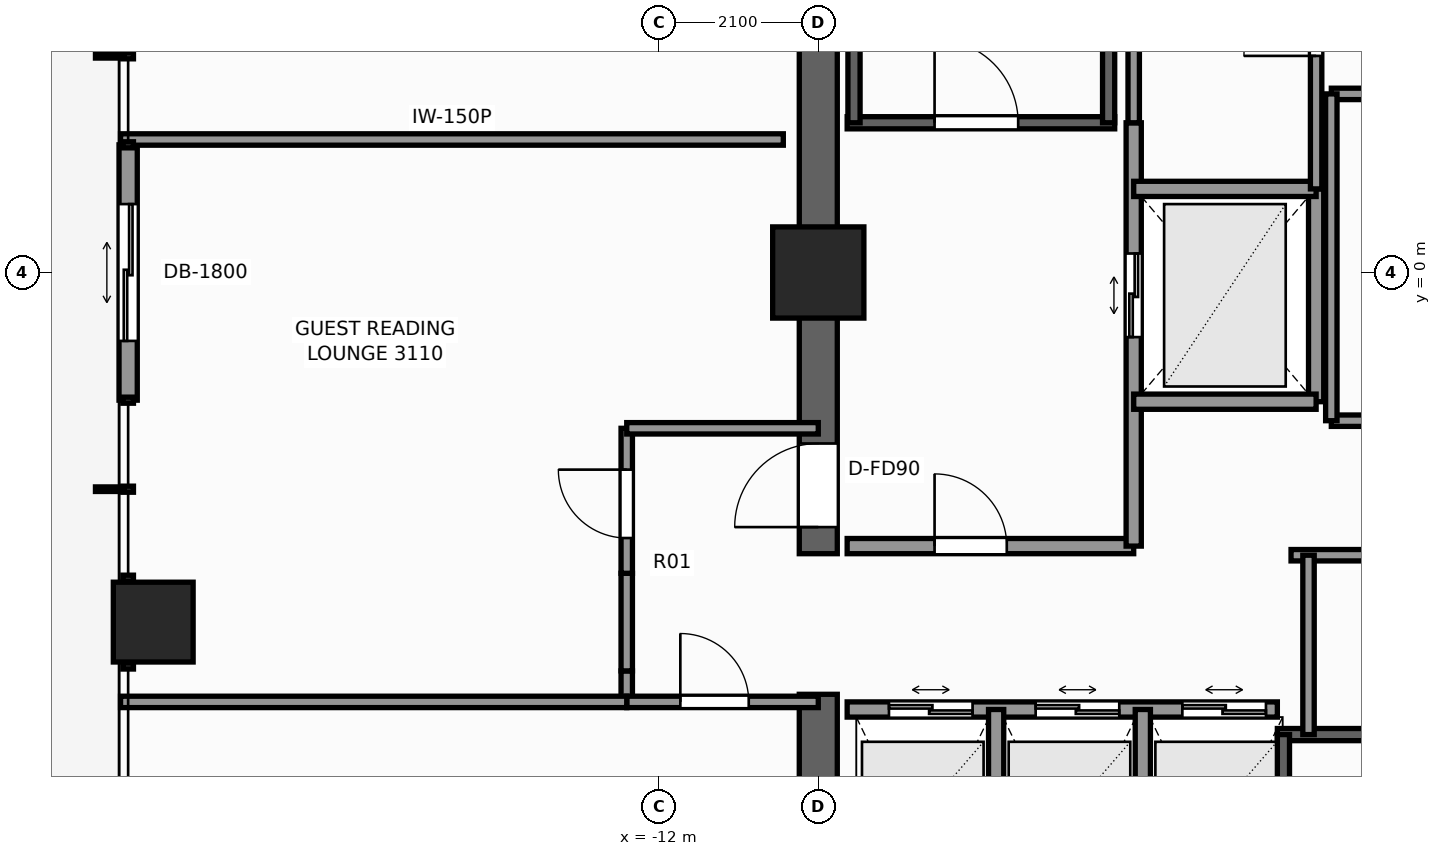
"""IFC4 building model, lengths in metres.
Left out: names, types, materials, properties, quantities, classifications, styles, units other than length and angle.
Written with IfcOpenShell. Run it as: python <this file> out.ifc"""

import sys

from ifc_helpers import new_model, si_unit, direction, frame, frame_2d, origin, origin_2d, place, context, subcontext, project, spatial, rectangle, extrude, element, fill, save


model = new_model("IFC4")
c1 = context("Model", 3, precision=1e-05, world=origin(), true_north=direction((0.0, 1.0)))
c2 = subcontext(c1, "Body", "Model", "MODEL_VIEW")
j1 = project(units=[si_unit("LENGTHUNIT", "METRE"), si_unit("PLANEANGLEUNIT", "RADIAN")], contexts=[c1])
p1 = place(None, origin())
s1 = spatial("IfcSite", under=j1, at=p1, CompositionType="ELEMENT")
p2 = place(p1, origin())
s2 = spatial("IfcBuilding", under=s1, at=p2, CompositionType="ELEMENT")
p3 = place(p2, frame((0.0, 0.0, 108.5)))
s3 = spatial("IfcBuildingStorey", under=s2, at=p3, CompositionType="ELEMENT", Elevation=108.5)
p4 = place(p3, frame((-9.9, -9.65, 0.0), z_axis=(0.0, 0.0, 1.0), x_axis=(0.0, 1.0, 0.0)))
e1 = element("IfcWall", 1, at=p4, inside=s3, PredefinedType="SHEAR", context=c2, shape_type="SweptSolid", body=[
    extrude(rectangle(XDim=4.1, YDim=0.5, at=frame_2d((2.05, 0.0))), origin(), (0.0, 0.0, 1.0), 3.3),
])
p5 = place(p3, frame((-9.9, -3.7, 0.0), z_axis=(0.0, 0.0, 1.0), x_axis=(0.0, 1.0, 0.0)))
e2 = element("IfcWall", 2, at=p5, inside=s3, PredefinedType="SHEAR", context=c2, shape_type="SweptSolid", body=[
    extrude(rectangle(XDim=13.35, YDim=0.5, at=frame_2d((6.675, 0.0))), origin(), (0.0, 0.0, 1.0), 3.3),
])
p6 = place(p5, frame((0.35, 0.0, 0.0)))
e3 = element("IfcOpeningElement", 3, at=p6, cuts=e2, PredefinedType="OPENING", context=c2, shape_type="SweptSolid", body=[
    extrude(rectangle(XDim=1.1, YDim=2.2, at=frame_2d((0.55, 1.1))), frame((0.0, 0.26, 0.0), z_axis=(0.0, -1.0, 0.0), x_axis=(1.0, 0.0, 0.0)), (0.0, 0.0, 1.0), 0.52),
])
p7 = place(p3, frame((-9.9, 0.0, 0.0), z_axis=(0.0, 0.0, 1.0), x_axis=(1.0, 0.0, 0.0)))
e4 = element("IfcColumn", 4, at=p7, inside=s3, PredefinedType="COLUMN", context=c2, shape_type="SweptSolid", body=[
    extrude(rectangle(XDim=1.2, YDim=1.2, at=origin_2d()), origin(), (0.0, 0.0, 1.0), 3.3),
])
p8 = place(p3, frame((-18.65, -4.6, 0.0), z_axis=(0.0, 0.0, 1.0), x_axis=(1.0, 0.0, 0.0)))
e5 = element("IfcColumn", 5, at=p8, inside=s3, PredefinedType="COLUMN", context=c2, shape_type="SweptSolid", body=[
    extrude(rectangle(XDim=1.05, YDim=1.05, at=origin_2d()), origin(), (0.0, 0.0, 1.0), 3.3),
])
p9 = place(p3, frame((-18.98, -1.68, 0.0), z_axis=(0.0, 0.0, 1.0), x_axis=(0.0, 1.0, 0.0)))
e6 = element("IfcWall", 6, at=p9, inside=s3, PredefinedType="STANDARD", context=c2, shape_type="SweptSolid", body=[
    extrude(rectangle(XDim=3.36, YDim=0.24, at=frame_2d((1.68, 0.0))), origin(), (0.0, 0.0, 1.0), 3.08),
])
p10 = place(p9, frame((0.78, 0.0, 0.0)))
e7 = element("IfcOpeningElement", 7, at=p10, cuts=e6, PredefinedType="OPENING", context=c2, shape_type="SweptSolid", body=[
    extrude(rectangle(XDim=1.8, YDim=2.2, at=frame_2d((0.9, 1.1))), frame((0.0, 0.13, 0.0), z_axis=(0.0, -1.0, 0.0), x_axis=(1.0, 0.0, 0.0)), (0.0, 0.0, 1.0), 0.26),
])
p11 = place(p3, frame((-9.52, 1.97, 0.0), z_axis=(0.0, 0.0, 1.0), x_axis=(1.0, 0.0, 0.0)))
e8 = element("IfcWall", 8, at=p11, inside=s3, PredefinedType="SHEAR", context=c2, shape_type="SweptSolid", body=[
    extrude(rectangle(XDim=3.52, YDim=0.16, at=frame_2d((1.76, 0.0))), origin(), (0.0, 0.0, 1.0), 3.3),
])
p12 = place(p11, frame((1.15, 0.0, 0.0)))
e9 = element("IfcOpeningElement", 9, at=p12, cuts=e8, PredefinedType="OPENING", context=c2, shape_type="SweptSolid", body=[
    extrude(rectangle(XDim=1.1, YDim=2.2, at=frame_2d((0.55, 1.1))), frame((0.0, 0.09, 0.0), z_axis=(0.0, -1.0, 0.0), x_axis=(1.0, 0.0, 0.0)), (0.0, 0.0, 1.0), 0.18),
])
for number, where, z_axis, x_axis in (
    (10, (-9.43, 1.97, 0.0), (0.0, 0.0, 1.0), (0.0, 1.0, 0.0)),
    (11, (-6.08, 1.97, 0.0), (0.0, 0.0, 1.0), (0.0, 1.0, 0.0)),
):
    element("IfcWall", number, at=place(p3, frame(where, z_axis=z_axis, x_axis=x_axis)), inside=s3, PredefinedType="SHEAR", context=c2, shape_type="SweptSolid", body=[
        extrude(rectangle(XDim=7.56, YDim=0.16, at=frame_2d((3.78, 0.0))), origin(), (0.0, 0.0, 1.0), 3.3),
    ])
p13 = place(p3, frame((-3.86, -6.08, 0.0), z_axis=(0.0, 0.0, 1.0), x_axis=(1.0, 0.0, 0.0)))
e12 = element("IfcWall", 12, at=p13, inside=s3, PredefinedType="SHEAR", context=c2, shape_type="SweptSolid", body=[
    extrude(rectangle(XDim=7.72, YDim=0.16, at=frame_2d((3.86, 0.0))), origin(), (0.0, 0.0, 1.0), 3.3),
])
p14 = place(p3, frame((-3.78, -9.43, 0.0), z_axis=(0.0, 0.0, 1.0), x_axis=(0.0, 1.0, 0.0)))
e13 = element("IfcWall", 13, at=p14, inside=s3, PredefinedType="SHEAR", context=c2, shape_type="SweptSolid", body=[
    extrude(rectangle(XDim=3.35, YDim=0.16, at=frame_2d((1.675, 0.0))), origin(), (0.0, 0.0, 1.0), 3.3),
])
p15 = place(p3, frame((-9.52, -3.6, 0.0), z_axis=(0.0, 0.0, 1.0), x_axis=(1.0, 0.0, 0.0)))
e14 = element("IfcWall", 14, at=p15, inside=s3, PredefinedType="SOLIDWALL", context=c2, shape_type="SweptSolid", body=[
    extrude(rectangle(XDim=3.77, YDim=0.2, at=frame_2d((1.885, 0.0))), origin(), (0.0, 0.0, 1.0), 3.08),
])
p16 = place(p15, frame((1.15, 0.0, 0.0)))
e15 = element("IfcOpeningElement", 15, at=p16, cuts=e14, PredefinedType="OPENING", context=c2, shape_type="SweptSolid", body=[
    extrude(rectangle(XDim=0.95, YDim=2.06, at=frame_2d((0.475, 1.03))), frame((0.0, 0.11, 0.0), z_axis=(0.0, -1.0, 0.0), x_axis=(1.0, 0.0, 0.0)), (0.0, 0.0, 1.0), 0.22),
])
p17 = place(p3, frame((-5.75, -3.6, 0.0), z_axis=(0.0, 0.0, 1.0), x_axis=(0.0, 1.0, 0.0)))
e16 = element("IfcWall", 16, at=p17, inside=s3, PredefinedType="SOLIDWALL", context=c2, shape_type="SweptSolid", body=[
    extrude(rectangle(XDim=5.57, YDim=0.2, at=frame_2d((2.785, 0.0))), origin(), (0.0, 0.0, 1.0), 2.715),
])
p18 = place(p17, frame((2.75, 0.0, 0.0)))
e17 = element("IfcOpeningElement", 17, at=p18, cuts=e16, PredefinedType="OPENING", context=c2, shape_type="SweptSolid", body=[
    extrude(rectangle(XDim=1.1, YDim=2.2, at=frame_2d((0.55, 1.1))), frame((0.0, 0.11, 0.0), z_axis=(0.0, -1.0, 0.0), x_axis=(1.0, 0.0, 0.0)), (0.0, 0.0, 1.0), 0.22),
])
p19 = place(p3, frame((-3.35, -1.7, 0.0), z_axis=(0.0, 0.0, 1.0), x_axis=(0.0, 1.0, 0.0)))
e18 = element("IfcWall", 18, at=p19, inside=s3, PredefinedType="SOLIDWALL", context=c2, shape_type="SweptSolid", body=[
    extrude(rectangle(XDim=2.8, YDim=0.2, at=frame_2d((1.4, 0.0))), origin(), (0.0, 0.0, 1.0), 2.715),
])
for number, where, z_axis, x_axis in (
    (19, (-5.75, -1.7, 0.0), (0.0, 0.0, 1.0), (1.0, 0.0, 0.0)),
    (20, (-5.75, 1.1, 0.0), (0.0, 0.0, 1.0), (1.0, 0.0, 0.0)),
):
    element("IfcWall", number, at=place(p3, frame(where, z_axis=z_axis, x_axis=x_axis)), inside=s3, PredefinedType="SOLIDWALL", context=c2, shape_type="SweptSolid", body=[
        extrude(rectangle(XDim=2.4, YDim=0.2, at=frame_2d((1.2, 0.0))), origin(), (0.0, 0.0, 1.0), 3.08),
    ])
p20 = place(p3, frame((-9.52, -5.75, 0.0), z_axis=(0.0, 0.0, 1.0), x_axis=(1.0, 0.0, 0.0)))
e21 = element("IfcWall", 21, at=p20, inside=s3, PredefinedType="SOLIDWALL", context=c2, shape_type="SweptSolid", body=[
    extrude(rectangle(XDim=5.66, YDim=0.2, at=frame_2d((2.83, 0.0))), origin(), (0.0, 0.0, 1.0), 3.08),
])
p21 = place(p20, frame((0.55, 0.0, 0.0)))
e22 = element("IfcOpeningElement", 22, at=p21, cuts=e21, PredefinedType="OPENING", context=c2, shape_type="SweptSolid", body=[
    extrude(rectangle(XDim=1.1, YDim=2.2, at=frame_2d((0.55, 1.1))), frame((0.0, 0.11, 0.0), z_axis=(0.0, -1.0, 0.0), x_axis=(1.0, 0.0, 0.0)), (0.0, 0.0, 1.0), 0.22),
])
p22 = place(p20, frame((2.48, 0.0, 0.0)))
e23 = element("IfcOpeningElement", 23, at=p22, cuts=e21, PredefinedType="OPENING", context=c2, shape_type="SweptSolid", body=[
    extrude(rectangle(XDim=1.1, YDim=2.2, at=frame_2d((0.55, 1.1))), frame((0.0, 0.11, 0.0), z_axis=(0.0, -1.0, 0.0), x_axis=(1.0, 0.0, 0.0)), (0.0, 0.0, 1.0), 0.22),
])
p23 = place(p20, frame((4.41, 0.0, 0.0)))
e24 = element("IfcOpeningElement", 24, at=p23, cuts=e21, PredefinedType="OPENING", context=c2, shape_type="SweptSolid", body=[
    extrude(rectangle(XDim=1.1, YDim=2.2, at=frame_2d((0.55, 1.1))), frame((0.0, 0.11, 0.0), z_axis=(0.0, -1.0, 0.0), x_axis=(1.0, 0.0, 0.0)), (0.0, 0.0, 1.0), 0.22),
])
for number, where, z_axis, x_axis in (
    (25, (-7.56, -9.52, 0.0), (0.0, 0.0, 1.0), (0.0, 1.0, 0.0)),
    (26, (-5.63, -9.52, 0.0), (0.0, 0.0, 1.0), (0.0, 1.0, 0.0)),
):
    element("IfcWall", number, at=place(p3, frame(where, z_axis=z_axis, x_axis=x_axis)), inside=s3, PredefinedType="SOLIDWALL", context=c2, shape_type="SweptSolid", body=[
        extrude(rectangle(XDim=3.77, YDim=0.2, at=frame_2d((1.885, 0.0))), origin(), (0.0, 0.0, 1.0), 3.08),
    ])
p24 = place(p3, frame((-3.15, 2.35, 0.0), z_axis=(0.0, 0.0, 1.0), x_axis=(1.0, 0.0, 0.0)))
e27 = element("IfcWall", 27, at=p24, inside=s3, PredefinedType="PARTITIONING", context=c2, shape_type="SweptSolid", body=[
    extrude(rectangle(XDim=6.3, YDim=0.15, at=frame_2d((3.15, 0.0))), origin(), (0.0, 0.0, 1.0), 2.715),
])
p25 = place(p24, frame((4.1, 0.0, 0.0)))
e28 = element("IfcOpeningElement", 28, at=p25, cuts=e27, PredefinedType="OPENING", context=c2, shape_type="SweptSolid", body=[
    extrude(rectangle(XDim=1.2, YDim=2.2, at=frame_2d((0.6, 1.1))), frame((0.0, 0.085, 0.0), z_axis=(0.0, -1.0, 0.0), x_axis=(1.0, 0.0, 0.0)), (0.0, 0.0, 1.0), 0.17),
])
p26 = place(p3, frame((-3.15, -1.95, 0.0), z_axis=(0.0, 0.0, 1.0), x_axis=(1.0, 0.0, 0.0)))
e29 = element("IfcWall", 29, at=p26, inside=s3, PredefinedType="PARTITIONING", context=c2, shape_type="SweptSolid", body=[
    extrude(rectangle(XDim=6.3, YDim=0.15, at=frame_2d((3.15, 0.0))), origin(), (0.0, 0.0, 1.0), 2.715),
])
p27 = place(p3, frame((-3.15, -1.95, 0.0), z_axis=(0.0, 0.0, 1.0), x_axis=(0.0, 1.0, 0.0)))
e30 = element("IfcWall", 30, at=p27, inside=s3, PredefinedType="PARTITIONING", context=c2, shape_type="SweptSolid", body=[
    extrude(rectangle(XDim=4.3, YDim=0.15, at=frame_2d((2.15, 0.0))), origin(), (0.0, 0.0, 1.0), 2.715),
])
p28 = place(p3, frame((-3.68, -3.72, 0.0), z_axis=(0.0, 0.0, 1.0), x_axis=(1.0, 0.0, 0.0)))
e31 = element("IfcWall", 31, at=p28, inside=s3, PredefinedType="PARTITIONING", context=c2, shape_type="SweptSolid", body=[
    extrude(rectangle(XDim=7.36, YDim=0.15, at=frame_2d((3.68, 0.0))), origin(), (0.0, 0.0, 1.0), 3.08),
])
p29 = place(p3, frame((-3.45, -6.08, 0.0), z_axis=(0.0, 0.0, 1.0), x_axis=(0.0, 1.0, 0.0)))
e32 = element("IfcWall", 32, at=p29, inside=s3, PredefinedType="PARTITIONING", context=c2, shape_type="SweptSolid", body=[
    extrude(rectangle(XDim=2.36, YDim=0.15, at=frame_2d((1.18, 0.0))), origin(), (0.0, 0.0, 1.0), 3.08),
])
p30 = place(p3, frame((-3.35, 1.1, 0.0), z_axis=(0.0, 0.0, 1.0), x_axis=(0.0, 1.0, 0.0)))
e33 = element("IfcWall", 33, at=p30, inside=s3, PredefinedType="PARTITIONING", context=c2, shape_type="SweptSolid", body=[
    extrude(rectangle(XDim=3.2, YDim=0.15, at=frame_2d((1.6, 0.0))), origin(), (0.0, 0.0, 1.0), 2.715),
])
p31 = place(p30, frame((1.75, 0.0, 0.0)))
e34 = element("IfcOpeningElement", 34, at=p31, cuts=e33, PredefinedType="OPENING", context=c2, shape_type="SweptSolid", body=[
    extrude(rectangle(XDim=0.95, YDim=2.06, at=frame_2d((0.475, 1.03))), frame((0.0, 0.085, 0.0), z_axis=(0.0, -1.0, 0.0), x_axis=(1.0, 0.0, 0.0)), (0.0, 0.0, 1.0), 0.17),
])
p32 = place(p3, frame((-5.75, 1.97, 0.0), z_axis=(0.0, 0.0, 1.0), x_axis=(0.0, 1.0, 0.0)))
e35 = element("IfcWall", 35, at=p32, inside=s3, PredefinedType="PARTITIONING", context=c2, shape_type="SweptSolid", body=[
    extrude(rectangle(XDim=2.33, YDim=0.15, at=frame_2d((1.165, 0.0))), origin(), (0.0, 0.0, 1.0), 2.715),
])
p33 = place(p3, frame((-12.42, -5.65, 0.0), z_axis=(0.0, 0.0, 1.0), x_axis=(0.0, 1.0, 0.0)))
e36 = element("IfcWall", 36, at=p33, inside=s3, PredefinedType="PARTITIONING", context=c2, shape_type="SweptSolid", body=[
    extrude(rectangle(XDim=0.408, YDim=0.15, at=frame_2d((0.204, 0.0))), origin(), (0.0, 0.0, 1.0), 3.08),
])
p34 = place(p3, frame((-12.42, -5.242, 0.0), z_axis=(0.0, 0.0, 1.0), x_axis=(0.0, 1.0, 0.0)))
e37 = element("IfcWall", 37, at=p34, inside=s3, PredefinedType="PARTITIONING", context=c2, shape_type="SweptSolid", body=[
    extrude(rectangle(XDim=1.284, YDim=0.15, at=frame_2d((0.642, 0.0))), origin(), (0.0, 0.0, 1.0), 1.265),
])
p35 = place(p3, frame((-12.42, -3.958, 0.0), z_axis=(0.0, 0.0, 1.0), x_axis=(0.0, 1.0, 0.0)))
e38 = element("IfcWall", 38, at=p35, inside=s3, PredefinedType="PARTITIONING", context=c2, shape_type="SweptSolid", body=[
    extrude(rectangle(XDim=1.908, YDim=0.15, at=frame_2d((0.954, 0.0))), origin(), (0.0, 0.0, 1.0), 3.08),
])
p36 = place(p35, frame((0.464, 0.0, 0.0)))
e39 = element("IfcOpeningElement", 39, at=p36, cuts=e38, PredefinedType="OPENING", context=c2, shape_type="SweptSolid", body=[
    extrude(rectangle(XDim=0.9, YDim=2.06, at=frame_2d((0.45, 1.03))), frame((0.0, 0.085, 0.0), z_axis=(0.0, -1.0, 0.0), x_axis=(1.0, 0.0, 0.0)), (0.0, 0.0, 1.0), 0.17),
])
p37 = place(p3, frame((-12.42, -2.05, 0.0), z_axis=(0.0, 0.0, 1.0), x_axis=(1.0, 0.0, 0.0)))
e40 = element("IfcWall", 40, at=p37, inside=s3, PredefinedType="PARTITIONING", context=c2, shape_type="SweptSolid", body=[
    extrude(rectangle(XDim=2.52, YDim=0.15, at=frame_2d((1.26, 0.0))), origin(), (0.0, 0.0, 1.0), 3.08),
])
p38 = place(p3, frame((-12.42, -5.65, 0.0), z_axis=(0.0, 0.0, 1.0), x_axis=(1.0, 0.0, 0.0)))
e41 = element("IfcWall", 41, at=p38, inside=s3, PredefinedType="PARTITIONING", context=c2, shape_type="SweptSolid", body=[
    extrude(rectangle(XDim=2.52, YDim=0.15, at=frame_2d((1.26, 0.0))), origin(), (0.0, 0.0, 1.0), 3.08),
])
p39 = place(p38, frame((0.705, 0.0, 0.0)))
e42 = element("IfcOpeningElement", 42, at=p39, cuts=e41, PredefinedType="OPENING", context=c2, shape_type="SweptSolid", body=[
    extrude(rectangle(XDim=0.9, YDim=2.06, at=frame_2d((0.45, 1.03))), frame((0.0, 0.085, 0.0), z_axis=(0.0, -1.0, 0.0), x_axis=(1.0, 0.0, 0.0)), (0.0, 0.0, 1.0), 0.17),
])
p40 = place(p3, frame((-19.08, 1.75, 0.0), z_axis=(0.0, 0.0, 1.0), x_axis=(1.0, 0.0, 0.0)))
e43 = element("IfcWall", 43, at=p40, inside=s3, PredefinedType="PARTITIONING", context=c2, shape_type="SweptSolid", body=[
    extrude(rectangle(XDim=8.72, YDim=0.15, at=frame_2d((4.36, 0.0))), origin(), (0.0, 0.0, 1.0), 2.449),
])
p41 = place(p3, frame((-19.08, -5.65, 0.0), z_axis=(0.0, 0.0, 1.0), x_axis=(1.0, 0.0, 0.0)))
e44 = element("IfcWall", 44, at=p41, inside=s3, PredefinedType="PARTITIONING", context=c2, shape_type="SweptSolid", body=[
    extrude(rectangle(XDim=6.66, YDim=0.15, at=frame_2d((3.33, 0.0))), origin(), (0.0, 0.0, 1.0), 2.449),
])
p42 = place(p10, origin())
e45 = element("IfcDoor", 45, at=p42, inside=s3, OperationType="DOUBLE_DOOR_SLIDING", PredefinedType="DOOR", context=c2, shape_type="SweptSolid", body=[
    extrude(rectangle(XDim=1.8, YDim=2.2, at=frame_2d((0.9, 1.1))), frame((0.0, 0.025, 0.0), z_axis=(0.0, -1.0, 0.0), x_axis=(1.0, 0.0, 0.0)), (0.0, 0.0, 1.0), 0.05),
])
fill(e7, e45)
p43 = place(p12, origin())
e46 = element("IfcDoor", 46, at=p43, inside=s3, OperationType="SINGLE_SWING_LEFT", PredefinedType="DOOR", context=c2, shape_type="SweptSolid", body=[
    extrude(rectangle(XDim=1.1, YDim=2.2, at=frame_2d((0.55, 1.1))), frame((0.0, 0.025, 0.0), z_axis=(0.0, -1.0, 0.0), x_axis=(1.0, 0.0, 0.0)), (0.0, 0.0, 1.0), 0.05),
])
fill(e9, e46)
p44 = place(p6, origin())
e47 = element("IfcDoor", 47, at=p44, inside=s3, OperationType="SINGLE_SWING_LEFT", PredefinedType="DOOR", context=c2, shape_type="SweptSolid", body=[
    extrude(rectangle(XDim=1.1, YDim=2.2, at=frame_2d((0.55, 1.1))), frame((0.0, 0.025, 0.0), z_axis=(0.0, -1.0, 0.0), x_axis=(1.0, 0.0, 0.0)), (0.0, 0.0, 1.0), 0.05),
])
fill(e3, e47)
p45 = place(p18, origin())
e48 = element("IfcDoor", 48, at=p45, inside=s3, OperationType="DOUBLE_DOOR_SLIDING", PredefinedType="DOOR", context=c2, shape_type="SweptSolid", body=[
    extrude(rectangle(XDim=1.1, YDim=2.2, at=frame_2d((0.55, 1.1))), frame((0.0, 0.025, 0.0), z_axis=(0.0, -1.0, 0.0), x_axis=(1.0, 0.0, 0.0)), (0.0, 0.0, 1.0), 0.05),
])
fill(e17, e48)
p46 = place(p21, origin())
e49 = element("IfcDoor", 49, at=p46, inside=s3, OperationType="DOUBLE_DOOR_SLIDING", PredefinedType="DOOR", context=c2, shape_type="SweptSolid", body=[
    extrude(rectangle(XDim=1.1, YDim=2.2, at=frame_2d((0.55, 1.1))), frame((0.0, 0.025, 0.0), z_axis=(0.0, -1.0, 0.0), x_axis=(1.0, 0.0, 0.0)), (0.0, 0.0, 1.0), 0.05),
])
fill(e22, e49)
p47 = place(p22, origin())
e50 = element("IfcDoor", 50, at=p47, inside=s3, OperationType="DOUBLE_DOOR_SLIDING", PredefinedType="DOOR", context=c2, shape_type="SweptSolid", body=[
    extrude(rectangle(XDim=1.1, YDim=2.2, at=frame_2d((0.55, 1.1))), frame((0.0, 0.025, 0.0), z_axis=(0.0, -1.0, 0.0), x_axis=(1.0, 0.0, 0.0)), (0.0, 0.0, 1.0), 0.05),
])
fill(e23, e50)
p48 = place(p23, origin())
e51 = element("IfcDoor", 51, at=p48, inside=s3, OperationType="DOUBLE_DOOR_SLIDING", PredefinedType="DOOR", context=c2, shape_type="SweptSolid", body=[
    extrude(rectangle(XDim=1.1, YDim=2.2, at=frame_2d((0.55, 1.1))), frame((0.0, 0.025, 0.0), z_axis=(0.0, -1.0, 0.0), x_axis=(1.0, 0.0, 0.0)), (0.0, 0.0, 1.0), 0.05),
])
fill(e24, e51)
p49 = place(p16, origin())
e52 = element("IfcDoor", 52, at=p49, inside=s3, OperationType="SINGLE_SWING_LEFT", PredefinedType="DOOR", context=c2, shape_type="SweptSolid", body=[
    extrude(rectangle(XDim=0.95, YDim=2.06, at=frame_2d((0.475, 1.03))), frame((0.0, 0.025, 0.0), z_axis=(0.0, -1.0, 0.0), x_axis=(1.0, 0.0, 0.0)), (0.0, 0.0, 1.0), 0.05),
])
fill(e15, e52)
p50 = place(p31, origin())
e53 = element("IfcDoor", 53, at=p50, inside=s3, OperationType="SINGLE_SWING_LEFT", PredefinedType="DOOR", context=c2, shape_type="SweptSolid", body=[
    extrude(rectangle(XDim=0.95, YDim=2.06, at=frame_2d((0.475, 1.03))), frame((0.0, 0.025, 0.0), z_axis=(0.0, -1.0, 0.0), x_axis=(1.0, 0.0, 0.0)), (0.0, 0.0, 1.0), 0.05),
])
fill(e34, e53)
p51 = place(p36, origin())
e54 = element("IfcDoor", 54, at=p51, inside=s3, OperationType="SINGLE_SWING_RIGHT", PredefinedType="DOOR", context=c2, shape_type="SweptSolid", body=[
    extrude(rectangle(XDim=0.9, YDim=2.06, at=frame_2d((0.45, 1.03))), frame((0.0, 0.025, 0.0), z_axis=(0.0, -1.0, 0.0), x_axis=(1.0, 0.0, 0.0)), (0.0, 0.0, 1.0), 0.05),
])
fill(e39, e54)
p52 = place(p39, origin())
e55 = element("IfcDoor", 55, at=p52, inside=s3, OperationType="SINGLE_SWING_LEFT", PredefinedType="DOOR", context=c2, shape_type="SweptSolid", body=[
    extrude(rectangle(XDim=0.9, YDim=2.06, at=frame_2d((0.45, 1.03))), frame((0.0, 0.025, 0.0), z_axis=(0.0, -1.0, 0.0), x_axis=(1.0, 0.0, 0.0)), (0.0, 0.0, 1.0), 0.05),
])
fill(e42, e55)
save(model, sys.argv[1])
